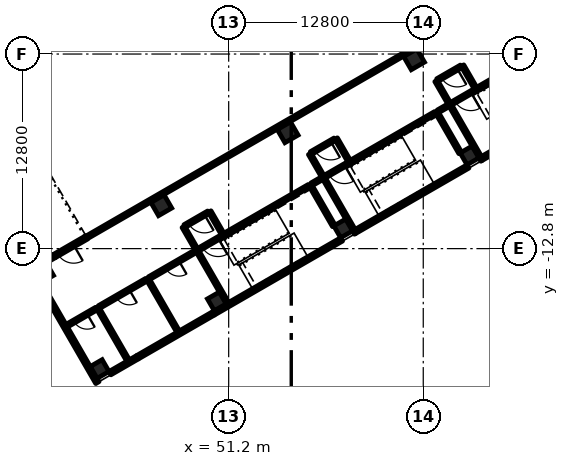
"""IFC4 building model, lengths in metres.
Left out: names, types, materials, properties, quantities, classifications, styles, units other than length and angle.
Written with IfcOpenShell. Run it as: python <this file> out.ifc"""

import sys

from ifc_helpers import new_model, si_unit, direction, frame, frame_2d, origin, origin_2d, place, context, subcontext, project, spatial, rectangle, extrude, element, fill, save


model = new_model("IFC4")
c1 = context("Model", 3, precision=1e-05, world=origin(), true_north=direction((0.0, 1.0)))
c2 = subcontext(c1, "Body", "Model", "MODEL_VIEW")
j1 = project(units=[si_unit("LENGTHUNIT", "METRE"), si_unit("PLANEANGLEUNIT", "RADIAN")], contexts=[c1])
p1 = place(None, origin())
s1 = spatial("IfcSite", under=j1, at=p1, CompositionType="ELEMENT")
p2 = place(p1, origin())
s2 = spatial("IfcBuilding", under=s1, at=p2, CompositionType="ELEMENT")
p3 = place(p2, frame((0.0, 0.0, 11.4)))
s3 = spatial("IfcBuildingStorey", under=s2, at=p3, CompositionType="ELEMENT", Elevation=11.4)
for number, where, z_axis, x_axis in (
    (1, (42.71, -20.721, 0.0), (0.0, 0.0, 1.0), (-0.5, 0.866, 0.0)),
    (2, (50.418, -16.271, 0.0), (0.0, 0.0, 1.0), (-0.5, 0.866, 0.0)),
    (3, (58.732, -11.471, 0.0), (0.0, 0.0, 1.0), (-0.5, 0.866, 0.0)),
    (4, (67.046, -6.671, 0.0), (0.0, 0.0, 1.0), (-0.5, 0.866, 0.0)),
    (5, (39.061, -14.399, 0.0), (0.0, 0.0, 1.0), (-0.5, 0.866, 0.0)),
):
    element("IfcColumn", number, at=place(p3, frame(where, z_axis=z_axis, x_axis=x_axis)), inside=s3, PredefinedType="COLUMN", context=c2, shape_type="SweptSolid", body=[
        extrude(rectangle(XDim=0.9, YDim=0.9, at=origin_2d()), origin(), (0.0, 0.0, 1.0), 4.8),
    ])
for number, where, z_axis, x_axis in (
    (6, (46.768, -9.949, 0.0), (0.0, 0.0, 1.0), (-0.5, 0.866, 0.0)),
    (7, (55.082, -5.149, 0.0), (0.0, 0.0, 1.0), (-0.5, 0.866, 0.0)),
    (8, (63.396, -0.349, 0.0), (0.0, 0.0, 1.0), (-0.5, 0.866, 0.0)),
):
    element("IfcColumn", number, at=place(p3, frame(where, z_axis=z_axis, x_axis=x_axis)), inside=s3, PredefinedType="COLUMN", context=c2, shape_type="SweptSolid", body=[
        extrude(rectangle(XDim=1.0, YDim=1.0, at=origin_2d()), origin(), (0.0, 0.0, 1.0), 4.8),
    ])
p4 = place(p3, frame((42.562, -21.615, 0.0), z_axis=(0.0, 0.0, 1.0), x_axis=(-0.500001855621, 0.866024332438, 0.0)))
e9 = element("IfcWall", 9, at=p4, inside=s3, PredefinedType="SOLIDWALL", context=c2, shape_type="SweptSolid", body=[
    extrude(rectangle(XDim=10.312, YDim=0.25, at=frame_2d((5.156, 0.0))), origin(), (0.0, 0.0, 1.0), 4.5),
])
p5 = place(p3, frame((45.206, -19.944, 0.0), z_axis=(0.0, 0.0, 1.0), x_axis=(-0.866009402589, -0.500027713859, 0.0)))
e10 = element("IfcWall", 10, at=p5, inside=s3, PredefinedType="SOLIDWALL", context=c2, shape_type="SweptSolid", body=[
    extrude(rectangle(XDim=2.1, YDim=0.25, at=frame_2d((1.05, 0.0))), origin(), (0.0, 0.0, 1.0), 4.5),
])
p6 = place(p3, frame((50.208, -17.056, 0.0), z_axis=(0.0, 0.0, 1.0), x_axis=(-0.866036343161, -0.499981051965, 0.0)))
e11 = element("IfcWall", 11, at=p6, inside=s3, PredefinedType="SOLIDWALL", context=c2, shape_type="SweptSolid", body=[
    extrude(rectangle(XDim=5.775, YDim=0.25, at=frame_2d((2.888, 0.0))), origin(), (0.0, 0.0, 1.0), 4.5),
])
p7 = place(p6, frame((3.525, 0.0, 0.9)))
e12 = element("IfcOpeningElement", 12, at=p7, cuts=e11, PredefinedType="OPENING", context=c2, shape_type="SweptSolid", body=[
    extrude(rectangle(XDim=2.0, YDim=1.8, at=frame_2d((1.0, 0.9))), frame((0.0, 0.135, 0.0), z_axis=(0.0, -1.0, 0.0), x_axis=(1.0, 0.0, 0.0)), (0.0, 0.0, 1.0), 0.27),
])
p8 = place(p6, frame((0.25, 0.0, 0.9)))
e13 = element("IfcOpeningElement", 13, at=p8, cuts=e11, PredefinedType="OPENING", context=c2, shape_type="SweptSolid", body=[
    extrude(rectangle(XDim=2.0, YDim=1.8, at=frame_2d((1.0, 0.9))), frame((0.0, 0.135, 0.0), z_axis=(0.0, -1.0, 0.0), x_axis=(1.0, 0.0, 0.0)), (0.0, 0.0, 1.0), 0.27),
])
p9 = place(p3, frame((58.63, -12.194, 0.0), z_axis=(0.0, 0.0, 1.0), x_axis=(-0.866023797515, -0.500002782129, 0.0)))
e14 = element("IfcWall", 14, at=p9, inside=s3, PredefinedType="SOLIDWALL", context=c2, shape_type="SweptSolid", body=[
    extrude(rectangle(XDim=9.725, YDim=0.25, at=frame_2d((4.863, 0.0))), origin(), (0.0, 0.0, 1.0), 4.5),
])
p10 = place(p3, frame((66.944, -7.394, 0.0), z_axis=(0.0, 0.0, 1.0), x_axis=(-0.866033360935, -0.499986217557, 0.0)))
e15 = element("IfcWall", 15, at=p10, inside=s3, PredefinedType="SOLIDWALL", context=c2, shape_type="SweptSolid", body=[
    extrude(rectangle(XDim=8.6, YDim=0.25, at=frame_2d((4.3, 0.0))), origin(), (0.0, 0.0, 1.0), 4.5),
])
p11 = place(p3, frame((75.258, -2.594, 0.0), z_axis=(0.0, 0.0, 1.0), x_axis=(-0.866028165386, -0.499995216735, 0.0)))
e16 = element("IfcWall", 16, at=p11, inside=s3, PredefinedType="SOLIDWALL", context=c2, shape_type="SweptSolid", body=[
    extrude(rectangle(XDim=8.6, YDim=0.25, at=frame_2d((4.3, 0.0))), origin(), (0.0, 0.0, 1.0), 4.5),
])
p12 = place(p3, frame((59.496, -11.694, 0.0), z_axis=(0.0, 0.0, 1.0), x_axis=(-0.865982457891, -0.500074377092, 0.0)))
e17 = element("IfcWall", 17, at=p12, inside=s3, PredefinedType="SOLIDWALL", context=c2, shape_type="SweptSolid", body=[
    extrude(rectangle(XDim=0.1, YDim=0.25, at=frame_2d((0.05, 0.0))), origin(), (0.0, 0.0, 1.0), 4.5),
])
p13 = place(p3, frame((67.81, -6.894, 0.0), z_axis=(0.0, 0.0, 1.0), x_axis=(-0.867038199201, -0.4982416694, 0.0)))
e18 = element("IfcWall", 18, at=p13, inside=s3, PredefinedType="SOLIDWALL", context=c2, shape_type="SweptSolid", body=[
    extrude(rectangle(XDim=0.1, YDim=0.25, at=frame_2d((0.05, 0.0))), origin(), (0.0, 0.0, 1.0), 4.5),
])
p14 = place(p3, frame((51.119, -16.385, 0.0), z_axis=(0.0, 0.0, 1.0), x_axis=(-0.49999894854, 0.866026010844, 0.0)))
e19 = element("IfcWall", 19, at=p14, inside=s3, PredefinedType="SOLIDWALL", context=c2, shape_type="SweptSolid", body=[
    extrude(rectangle(XDim=4.0, YDim=0.2, at=frame_2d((2.0, 0.0))), origin(), (0.0, 0.0, 1.0), 4.5),
])
p15 = place(p3, frame((58.117, -11.306, 0.0), z_axis=(0.0, 0.0, 1.0), x_axis=(-0.499933790963, 0.866063626216, 0.0)))
e20 = element("IfcWall", 20, at=p15, inside=s3, PredefinedType="SOLIDWALL", context=c2, shape_type="SweptSolid", body=[
    extrude(rectangle(XDim=3.1, YDim=0.2, at=frame_2d((1.55, 0.0))), origin(), (0.0, 0.0, 1.0), 4.5),
])
p16 = place(p3, frame((59.433, -11.585, 0.0), z_axis=(0.0, 0.0, 1.0), x_axis=(-0.49999894854, 0.866026010844, 0.0)))
e21 = element("IfcWall", 21, at=p16, inside=s3, PredefinedType="SOLIDWALL", context=c2, shape_type="SweptSolid", body=[
    extrude(rectangle(XDim=4.0, YDim=0.2, at=frame_2d((2.0, 0.0))), origin(), (0.0, 0.0, 1.0), 4.5),
])
p17 = place(p3, frame((66.431, -6.506, 0.0), z_axis=(0.0, 0.0, 1.0), x_axis=(-0.49999285859, 0.86602952684, 0.0)))
e22 = element("IfcWall", 22, at=p17, inside=s3, PredefinedType="SOLIDWALL", context=c2, shape_type="SweptSolid", body=[
    extrude(rectangle(XDim=3.1, YDim=0.2, at=frame_2d((1.55, 0.0))), origin(), (0.0, 0.0, 1.0), 4.5),
])
p18 = place(p3, frame((67.747, -6.785, 0.0), z_axis=(0.0, 0.0, 1.0), x_axis=(-0.49999894854, 0.866026010844, 0.0)))
e23 = element("IfcWall", 23, at=p18, inside=s3, PredefinedType="SOLIDWALL", context=c2, shape_type="SweptSolid", body=[
    extrude(rectangle(XDim=4.0, YDim=0.2, at=frame_2d((2.0, 0.0))), origin(), (0.0, 0.0, 1.0), 4.5),
])
p19 = place(p3, frame((50.722, -11.996, 0.0), z_axis=(0.0, 0.0, 1.0), x_axis=(-0.866036909293, -0.499980071345, 0.0)))
e24 = element("IfcWall", 24, at=p19, inside=s3, PredefinedType="SOLIDWALL", context=c2, shape_type="SweptSolid", body=[
    extrude(rectangle(XDim=1.75, YDim=0.2, at=frame_2d((0.875, 0.0))), origin(), (0.0, 0.0, 1.0), 4.5),
])
p20 = place(p19, frame((0.25, 0.0, 0.0)))
e25 = element("IfcOpeningElement", 25, at=p20, cuts=e24, PredefinedType="OPENING", context=c2, shape_type="SweptSolid", body=[
    extrude(rectangle(XDim=1.2, YDim=2.1, at=frame_2d((0.6, 1.05))), frame((0.0, 0.11, 0.0), z_axis=(0.0, -1.0, 0.0), x_axis=(1.0, 0.0, 0.0)), (0.0, 0.0, 1.0), 0.22),
])
p21 = place(p3, frame((50.722, -11.996, 0.0), z_axis=(0.0, 0.0, 1.0), x_axis=(0.866027239912, 0.49999681972, 0.0)))
e26 = element("IfcWall", 26, at=p21, inside=s3, PredefinedType="SOLIDWALL", context=c2, shape_type="SweptSolid", body=[
    extrude(rectangle(XDim=6.65, YDim=0.2, at=frame_2d((3.325, 0.0))), origin(), (0.0, 0.0, 1.0), 4.5),
])
p22 = place(p3, frame((59.035, -7.196, 0.0), z_axis=(0.0, 0.0, 1.0), x_axis=(-0.866002029911, -0.500040482552, 0.0)))
e27 = element("IfcWall", 27, at=p22, inside=s3, PredefinedType="SOLIDWALL", context=c2, shape_type="SweptSolid", body=[
    extrude(rectangle(XDim=1.75, YDim=0.2, at=frame_2d((0.875, 0.0))), origin(), (0.0, 0.0, 1.0), 4.5),
])
p23 = place(p22, frame((0.25, 0.0, 0.0)))
e28 = element("IfcOpeningElement", 28, at=p23, cuts=e27, PredefinedType="OPENING", context=c2, shape_type="SweptSolid", body=[
    extrude(rectangle(XDim=1.2, YDim=2.1, at=frame_2d((0.6, 1.05))), frame((0.0, 0.11, 0.0), z_axis=(0.0, -1.0, 0.0), x_axis=(1.0, 0.0, 0.0)), (0.0, 0.0, 1.0), 0.22),
])
p24 = place(p3, frame((59.035, -7.196, 0.0), z_axis=(0.0, 0.0, 1.0), x_axis=(0.866027239912, 0.49999681972, 0.0)))
e29 = element("IfcWall", 29, at=p24, inside=s3, PredefinedType="SOLIDWALL", context=c2, shape_type="SweptSolid", body=[
    extrude(rectangle(XDim=6.65, YDim=0.2, at=frame_2d((3.325, 0.0))), origin(), (0.0, 0.0, 1.0), 4.5),
])
p25 = place(p3, frame((67.349, -2.396, 0.0), z_axis=(0.0, 0.0, 1.0), x_axis=(-0.866036909293, -0.499980071345, 0.0)))
e30 = element("IfcWall", 30, at=p25, inside=s3, PredefinedType="SOLIDWALL", context=c2, shape_type="SweptSolid", body=[
    extrude(rectangle(XDim=1.75, YDim=0.2, at=frame_2d((0.875, 0.0))), origin(), (0.0, 0.0, 1.0), 4.5),
])
p26 = place(p25, frame((0.25, 0.0, 0.0)))
e31 = element("IfcOpeningElement", 31, at=p26, cuts=e30, PredefinedType="OPENING", context=c2, shape_type="SweptSolid", body=[
    extrude(rectangle(XDim=1.2, YDim=2.1, at=frame_2d((0.6, 1.05))), frame((0.0, 0.11, 0.0), z_axis=(0.0, -1.0, 0.0), x_axis=(1.0, 0.0, 0.0)), (0.0, 0.0, 1.0), 0.22),
])
p27 = place(p3, frame((67.349, -2.396, 0.0), z_axis=(0.0, 0.0, 1.0), x_axis=(0.86601134256, 0.500024353964, 0.0)))
e32 = element("IfcWall", 32, at=p27, inside=s3, PredefinedType="SOLIDWALL", context=c2, shape_type="SweptSolid", body=[
    extrude(rectangle(XDim=6.65, YDim=0.2, at=frame_2d((3.325, 0.0))), origin(), (0.0, 0.0, 1.0), 4.5),
])
for number, where, z_axis, x_axis in (
    (33, (49.07, -12.835, 0.0), (0.0, 0.0, 1.0), (-0.5, 0.866, 0.0)),
    (34, (50.802, -11.835, 0.0), (0.0, 0.0, 1.0), (-0.5, 0.866, 0.0)),
):
    element("IfcWall", number, at=place(p3, frame(where, z_axis=z_axis, x_axis=x_axis)), inside=s3, PredefinedType="PARTITIONING", context=c2, shape_type="SweptSolid", body=[
        extrude(rectangle(XDim=1.7, YDim=0.2, at=frame_2d((0.85, 0.0))), origin(), (0.0, 0.0, 1.0), 3.9),
    ])
for number, where, z_axis, x_axis in (
    (35, (57.383, -8.035, 0.0), (0.0, 0.0, 1.0), (-0.5, 0.866, 0.0)),
    (36, (59.115, -7.035, 0.0), (0.0, 0.0, 1.0), (-0.5, 0.866, 0.0)),
):
    element("IfcWall", number, at=place(p3, frame(where, z_axis=z_axis, x_axis=x_axis)), inside=s3, PredefinedType="PARTITIONING", context=c2, shape_type="SweptSolid", body=[
        extrude(rectangle(XDim=1.7, YDim=0.2, at=frame_2d((0.85, 0.0))), origin(), (0.0, 0.0, 1.0), 3.9),
    ])
p28 = place(p3, frame((65.697, -3.235, 0.0), z_axis=(0.0, 0.0, 1.0), x_axis=(-0.499892348375, 0.866087547558, 0.0)))
e37 = element("IfcWall", 37, at=p28, inside=s3, PredefinedType="PARTITIONING", context=c2, shape_type="SweptSolid", body=[
    extrude(rectangle(XDim=1.7, YDim=0.2, at=frame_2d((0.85, 0.0))), origin(), (0.0, 0.0, 1.0), 3.9),
])
p29 = place(p3, frame((67.429, -2.235, 0.0), z_axis=(0.0, 0.0, 1.0), x_axis=(-0.500000056704, 0.866025371046, 0.0)))
e38 = element("IfcWall", 38, at=p29, inside=s3, PredefinedType="PARTITIONING", context=c2, shape_type="SweptSolid", body=[
    extrude(rectangle(XDim=1.7, YDim=0.2, at=frame_2d((0.85, 0.0))), origin(), (0.0, 0.0, 1.0), 3.9),
])
p30 = place(p3, frame((49.865, -10.413, 0.0), z_axis=(0.0, 0.0, 1.0), x_axis=(-0.866047807691, -0.499961193289, 0.0)))
e39 = element("IfcWall", 39, at=p30, inside=s3, PredefinedType="PARTITIONING", context=c2, shape_type="SweptSolid", body=[
    extrude(rectangle(XDim=1.8, YDim=0.2, at=frame_2d((0.9, 0.0))), origin(), (0.0, 0.0, 1.0), 3.9),
])
p31 = place(p30, frame((0.3, 0.0, 0.0)))
e40 = element("IfcOpeningElement", 40, at=p31, cuts=e39, PredefinedType="OPENING", context=c2, shape_type="SweptSolid", body=[
    extrude(rectangle(XDim=1.2, YDim=2.1, at=frame_2d((0.6, 1.05))), frame((0.0, 0.11, 0.0), z_axis=(0.0, -1.0, 0.0), x_axis=(1.0, 0.0, 0.0)), (0.0, 0.0, 1.0), 0.22),
])
p32 = place(p3, frame((58.179, -5.613, 0.0), z_axis=(0.0, 0.0, 1.0), x_axis=(-0.866047807691, -0.499961193289, 0.0)))
e41 = element("IfcWall", 41, at=p32, inside=s3, PredefinedType="PARTITIONING", context=c2, shape_type="SweptSolid", body=[
    extrude(rectangle(XDim=1.8, YDim=0.2, at=frame_2d((0.9, 0.0))), origin(), (0.0, 0.0, 1.0), 3.9),
])
p33 = place(p32, frame((0.3, 0.0, 0.0)))
e42 = element("IfcOpeningElement", 42, at=p33, cuts=e41, PredefinedType="OPENING", context=c2, shape_type="SweptSolid", body=[
    extrude(rectangle(XDim=1.2, YDim=2.1, at=frame_2d((0.6, 1.05))), frame((0.0, 0.11, 0.0), z_axis=(0.0, -1.0, 0.0), x_axis=(1.0, 0.0, 0.0)), (0.0, 0.0, 1.0), 0.22),
])
p34 = place(p3, frame((66.493, -0.812, 0.0), z_axis=(0.0, 0.0, 1.0), x_axis=(-0.866081705922, -0.499902469156, 0.0)))
e43 = element("IfcWall", 43, at=p34, inside=s3, PredefinedType="PARTITIONING", context=c2, shape_type="SweptSolid", body=[
    extrude(rectangle(XDim=1.8, YDim=0.2, at=frame_2d((0.9, 0.0))), origin(), (0.0, 0.0, 1.0), 3.9),
])
p35 = place(p34, frame((0.3, 0.0, 0.0)))
e44 = element("IfcOpeningElement", 44, at=p35, cuts=e43, PredefinedType="OPENING", context=c2, shape_type="SweptSolid", body=[
    extrude(rectangle(XDim=1.2, YDim=2.1, at=frame_2d((0.6, 1.05))), frame((0.0, 0.11, 0.0), z_axis=(0.0, -1.0, 0.0), x_axis=(1.0, 0.0, 0.0)), (0.0, 0.0, 1.0), 0.22),
])
p36 = place(p3, frame((38.358, -14.083, 0.0), z_axis=(0.0, 0.0, 1.0), x_axis=(0.865989903783, 0.500061482766, 0.0)))
e45 = element("IfcWall", 45, at=p36, inside=s3, PredefinedType="SOLIDWALL", context=c2, shape_type="SweptSolid", body=[
    extrude(rectangle(XDim=1.6, YDim=0.25, at=frame_2d((0.8, 0.0))), origin(), (0.0, 0.0, 1.0), 3.9),
])
p37 = place(p3, frame((41.866, -12.058, 0.0), z_axis=(0.0, 0.0, 1.0), x_axis=(-0.866057815567, -0.499943856944, 0.0)))
e46 = element("IfcWall", 46, at=p37, inside=s3, PredefinedType="SOLIDWALL", context=c2, shape_type="SweptSolid", body=[
    extrude(rectangle(XDim=2.45, YDim=0.25, at=frame_2d((1.225, 0.0))), origin(), (0.0, 0.0, 1.0), 3.9),
])
p38 = place(p37, frame((1.0, 0.0, 0.0)))
e47 = element("IfcOpeningElement", 47, at=p38, cuts=e46, PredefinedType="OPENING", context=c2, shape_type="SweptSolid", body=[
    extrude(rectangle(XDim=1.2, YDim=2.1, at=frame_2d((0.6, 1.05))), frame((0.0, 0.135, 0.0), z_axis=(0.0, -1.0, 0.0), x_axis=(1.0, 0.0, 0.0)), (0.0, 0.0, 1.0), 0.27),
])
p39 = place(p3, frame((44.581, -20.16, 0.0), z_axis=(0.0, 0.0, 1.0), x_axis=(-0.49999894854, 0.866026010844, 0.0)))
e48 = element("IfcWall", 48, at=p39, inside=s3, PredefinedType="PARTITIONING", context=c2, shape_type="SweptSolid", body=[
    extrude(rectangle(XDim=4.0, YDim=0.2, at=frame_2d((2.0, 0.0))), origin(), (0.0, 0.0, 1.0), 3.9),
])
p40 = place(p3, frame((42.494, -16.746, 0.0), z_axis=(0.0, 0.0, 1.0), x_axis=(-0.866017533419, -0.500013631625, 0.0)))
e49 = element("IfcWall", 49, at=p40, inside=s3, PredefinedType="PARTITIONING", context=c2, shape_type="SweptSolid", body=[
    extrude(rectangle(XDim=2.25, YDim=0.2, at=frame_2d((1.125, 0.0))), origin(), (0.0, 0.0, 1.0), 3.9),
])
p41 = place(p40, frame((0.7, 0.0, 0.0)))
e50 = element("IfcOpeningElement", 50, at=p41, cuts=e49, PredefinedType="OPENING", context=c2, shape_type="SweptSolid", body=[
    extrude(rectangle(XDim=1.0, YDim=2.1, at=frame_2d((0.5, 1.05))), frame((0.0, 0.11, 0.0), z_axis=(0.0, -1.0, 0.0), x_axis=(1.0, 0.0, 0.0)), (0.0, 0.0, 1.0), 0.22),
])
p42 = place(p3, frame((47.872, -18.26, 0.0), z_axis=(0.0, 0.0, 1.0), x_axis=(-0.49999894854, 0.866026010844, 0.0)))
e51 = element("IfcWall", 51, at=p42, inside=s3, PredefinedType="PARTITIONING", context=c2, shape_type="SweptSolid", body=[
    extrude(rectangle(XDim=4.0, YDim=0.2, at=frame_2d((2.0, 0.0))), origin(), (0.0, 0.0, 1.0), 3.9),
])
p43 = place(p3, frame((45.785, -14.846, 0.0), z_axis=(0.0, 0.0, 1.0), x_axis=(-0.866035395735, -0.499982693035, 0.0)))
e52 = element("IfcWall", 52, at=p43, inside=s3, PredefinedType="PARTITIONING", context=c2, shape_type="SweptSolid", body=[
    extrude(rectangle(XDim=3.6, YDim=0.2, at=frame_2d((1.8, 0.0))), origin(), (0.0, 0.0, 1.0), 3.9),
])
p44 = place(p43, frame((1.3, 0.0, 0.0)))
e53 = element("IfcOpeningElement", 53, at=p44, cuts=e52, PredefinedType="OPENING", context=c2, shape_type="SweptSolid", body=[
    extrude(rectangle(XDim=1.0, YDim=2.1, at=frame_2d((0.5, 1.05))), frame((0.0, 0.11, 0.0), z_axis=(0.0, -1.0, 0.0), x_axis=(1.0, 0.0, 0.0)), (0.0, 0.0, 1.0), 0.22),
])
p45 = place(p3, frame((49.033, -12.971, 0.0), z_axis=(0.0, 0.0, 1.0), x_axis=(-0.8660424351, -0.499970499736, 0.0)))
e54 = element("IfcWall", 54, at=p45, inside=s3, PredefinedType="PARTITIONING", context=c2, shape_type="SweptSolid", body=[
    extrude(rectangle(XDim=3.55, YDim=0.2, at=frame_2d((1.775, 0.0))), origin(), (0.0, 0.0, 1.0), 3.9),
])
p46 = place(p45, frame((1.275, 0.0, 0.0)))
e55 = element("IfcOpeningElement", 55, at=p46, cuts=e54, PredefinedType="OPENING", context=c2, shape_type="SweptSolid", body=[
    extrude(rectangle(XDim=1.0, YDim=2.1, at=frame_2d((0.5, 1.05))), frame((0.0, 0.11, 0.0), z_axis=(0.0, -1.0, 0.0), x_axis=(1.0, 0.0, 0.0)), (0.0, 0.0, 1.0), 0.22),
])
p47 = place(p3, frame((56.654, -8.571, 0.0), z_axis=(0.0, 0.0, 1.0), x_axis=(0.866094119867, 0.499880961361, 0.0)))
e56 = element("IfcWall", 56, at=p47, inside=s3, PredefinedType="PARTITIONING", context=c2, shape_type="SweptSolid", body=[
    extrude(rectangle(XDim=0.8, YDim=0.2, at=frame_2d((0.4, 0.0))), origin(), (0.0, 0.0, 1.0), 3.9),
])
p48 = place(p3, frame((64.968, -3.771, 0.0), z_axis=(0.0, 0.0, 1.0), x_axis=(0.865885638426, 0.500242002602, 0.0)))
e57 = element("IfcWall", 57, at=p48, inside=s3, PredefinedType="PARTITIONING", context=c2, shape_type="SweptSolid", body=[
    extrude(rectangle(XDim=0.8, YDim=0.2, at=frame_2d((0.4, 0.0))), origin(), (0.0, 0.0, 1.0), 3.9),
])
p49 = place(p3, frame((41.866, -12.058, 0.0), z_axis=(0.0, 0.0, 1.0), x_axis=(0.866022857395, 0.50000441045, 0.0)))
e58 = element("IfcWall", 58, at=p49, inside=s3, PredefinedType="PARTITIONING", context=c2, shape_type="SweptSolid", body=[
    extrude(rectangle(XDim=39.4, YDim=0.2, at=frame_2d((19.7, 0.0))), origin(), (0.0, 0.0, 1.0), 3.9),
])
p50 = place(p7, origin())
e59 = element("IfcWindow", 59, at=p50, inside=s3, PartitioningType="SINGLE_PANEL", PredefinedType="WINDOW", context=c2, shape_type="SweptSolid", body=[
    extrude(rectangle(XDim=2.0, YDim=1.8, at=frame_2d((1.0, 0.9))), frame((0.0, 0.03, 0.0), z_axis=(0.0, -1.0, 0.0), x_axis=(1.0, 0.0, 0.0)), (0.0, 0.0, 1.0), 0.06),
])
fill(e12, e59)
p51 = place(p8, origin())
e60 = element("IfcWindow", 60, at=p51, inside=s3, PartitioningType="SINGLE_PANEL", PredefinedType="WINDOW", context=c2, shape_type="SweptSolid", body=[
    extrude(rectangle(XDim=2.0, YDim=1.8, at=frame_2d((1.0, 0.9))), frame((0.0, 0.03, 0.0), z_axis=(0.0, -1.0, 0.0), x_axis=(1.0, 0.0, 0.0)), (0.0, 0.0, 1.0), 0.06),
])
fill(e13, e60)
p52 = place(p20, origin())
e61 = element("IfcDoor", 61, at=p52, inside=s3, OperationType="SINGLE_SWING_LEFT", PredefinedType="DOOR", context=c2, shape_type="SweptSolid", body=[
    extrude(rectangle(XDim=1.2, YDim=2.1, at=frame_2d((0.6, 1.05))), frame((0.0, 0.025, 0.0), z_axis=(0.0, -1.0, 0.0), x_axis=(1.0, 0.0, 0.0)), (0.0, 0.0, 1.0), 0.05),
])
fill(e25, e61)
p53 = place(p23, origin())
e62 = element("IfcDoor", 62, at=p53, inside=s3, OperationType="SINGLE_SWING_LEFT", PredefinedType="DOOR", context=c2, shape_type="SweptSolid", body=[
    extrude(rectangle(XDim=1.2, YDim=2.1, at=frame_2d((0.6, 1.05))), frame((0.0, 0.025, 0.0), z_axis=(0.0, -1.0, 0.0), x_axis=(1.0, 0.0, 0.0)), (0.0, 0.0, 1.0), 0.05),
])
fill(e28, e62)
p54 = place(p26, origin())
e63 = element("IfcDoor", 63, at=p54, inside=s3, OperationType="SINGLE_SWING_LEFT", PredefinedType="DOOR", context=c2, shape_type="SweptSolid", body=[
    extrude(rectangle(XDim=1.2, YDim=2.1, at=frame_2d((0.6, 1.05))), frame((0.0, 0.025, 0.0), z_axis=(0.0, -1.0, 0.0), x_axis=(1.0, 0.0, 0.0)), (0.0, 0.0, 1.0), 0.05),
])
fill(e31, e63)
p55 = place(p31, origin())
e64 = element("IfcDoor", 64, at=p55, inside=s3, OperationType="SINGLE_SWING_LEFT", PredefinedType="DOOR", context=c2, shape_type="SweptSolid", body=[
    extrude(rectangle(XDim=1.2, YDim=2.1, at=frame_2d((0.6, 1.05))), frame((0.0, 0.025, 0.0), z_axis=(0.0, -1.0, 0.0), x_axis=(1.0, 0.0, 0.0)), (0.0, 0.0, 1.0), 0.05),
])
fill(e40, e64)
p56 = place(p33, origin())
e65 = element("IfcDoor", 65, at=p56, inside=s3, OperationType="SINGLE_SWING_LEFT", PredefinedType="DOOR", context=c2, shape_type="SweptSolid", body=[
    extrude(rectangle(XDim=1.2, YDim=2.1, at=frame_2d((0.6, 1.05))), frame((0.0, 0.025, 0.0), z_axis=(0.0, -1.0, 0.0), x_axis=(1.0, 0.0, 0.0)), (0.0, 0.0, 1.0), 0.05),
])
fill(e42, e65)
p57 = place(p35, origin())
e66 = element("IfcDoor", 66, at=p57, inside=s3, OperationType="SINGLE_SWING_LEFT", PredefinedType="DOOR", context=c2, shape_type="SweptSolid", body=[
    extrude(rectangle(XDim=1.2, YDim=2.1, at=frame_2d((0.6, 1.05))), frame((0.0, 0.025, 0.0), z_axis=(0.0, -1.0, 0.0), x_axis=(1.0, 0.0, 0.0)), (0.0, 0.0, 1.0), 0.05),
])
fill(e44, e66)
p58 = place(p38, origin())
e67 = element("IfcDoor", 67, at=p58, inside=s3, OperationType="SINGLE_SWING_LEFT", PredefinedType="DOOR", context=c2, shape_type="SweptSolid", body=[
    extrude(rectangle(XDim=1.2, YDim=2.1, at=frame_2d((0.6, 1.05))), frame((0.0, 0.025, 0.0), z_axis=(0.0, -1.0, 0.0), x_axis=(1.0, 0.0, 0.0)), (0.0, 0.0, 1.0), 0.05),
])
fill(e47, e67)
p59 = place(p41, origin())
e68 = element("IfcDoor", 68, at=p59, inside=s3, OperationType="SINGLE_SWING_LEFT", PredefinedType="DOOR", context=c2, shape_type="SweptSolid", body=[
    extrude(rectangle(XDim=1.0, YDim=2.1, at=frame_2d((0.5, 1.05))), frame((0.0, 0.025, 0.0), z_axis=(0.0, -1.0, 0.0), x_axis=(1.0, 0.0, 0.0)), (0.0, 0.0, 1.0), 0.05),
])
fill(e50, e68)
p60 = place(p44, origin())
e69 = element("IfcDoor", 69, at=p60, inside=s3, OperationType="SINGLE_SWING_LEFT", PredefinedType="DOOR", context=c2, shape_type="SweptSolid", body=[
    extrude(rectangle(XDim=1.0, YDim=2.1, at=frame_2d((0.5, 1.05))), frame((0.0, 0.025, 0.0), z_axis=(0.0, -1.0, 0.0), x_axis=(1.0, 0.0, 0.0)), (0.0, 0.0, 1.0), 0.05),
])
fill(e53, e69)
p61 = place(p46, origin())
e70 = element("IfcDoor", 70, at=p61, inside=s3, OperationType="SINGLE_SWING_LEFT", PredefinedType="DOOR", context=c2, shape_type="SweptSolid", body=[
    extrude(rectangle(XDim=1.0, YDim=2.1, at=frame_2d((0.5, 1.05))), frame((0.0, 0.025, 0.0), z_axis=(0.0, -1.0, 0.0), x_axis=(1.0, 0.0, 0.0)), (0.0, 0.0, 1.0), 0.05),
])
fill(e55, e70)
save(model, sys.argv[1])
